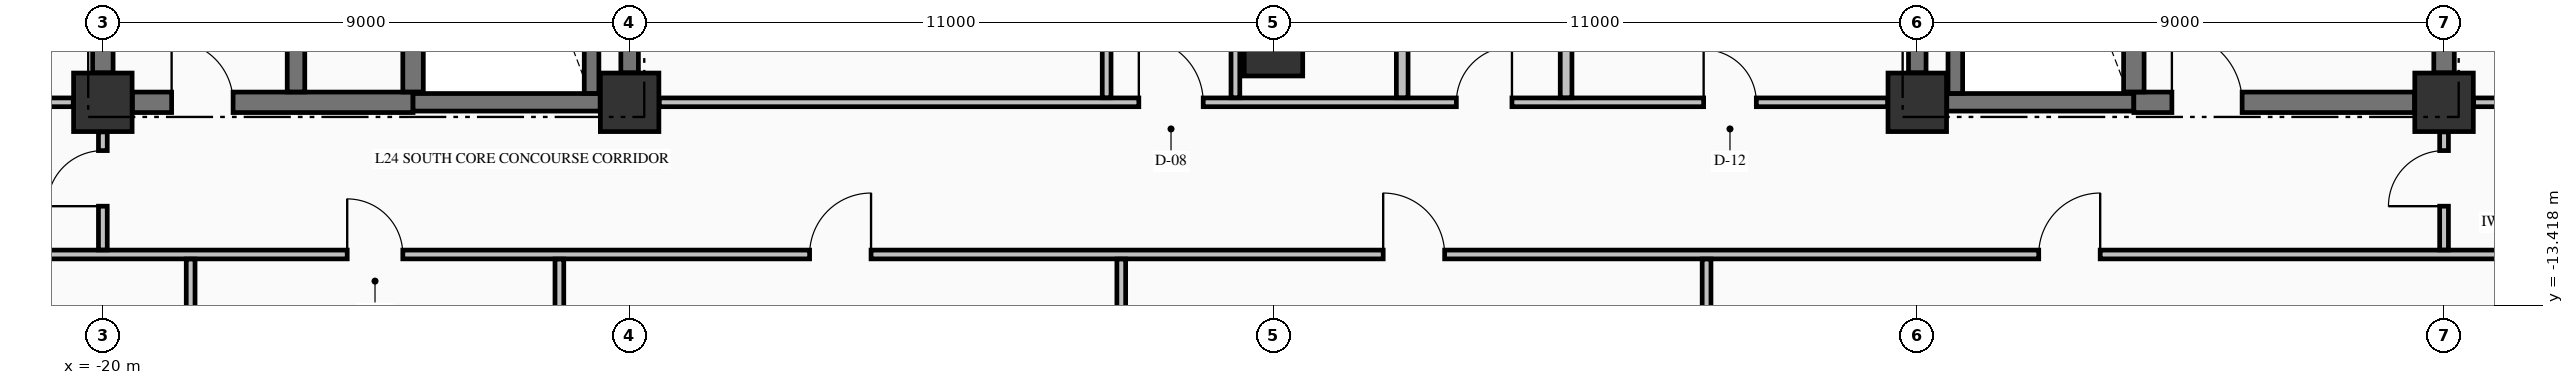
"""IFC4 building model, lengths in metres.
Left out: names, types, materials, properties, quantities, classifications, styles, units other than length and angle.
Written with IfcOpenShell. Run it as: python <this file> out.ifc"""

import sys

from ifc_helpers import new_model, si_unit, direction, frame, frame_2d, origin, origin_2d, place, context, subcontext, project, spatial, rectangle, extrude, element, fill, save


model = new_model("IFC4")
c1 = context("Model", 3, precision=1e-05, world=origin(), true_north=direction((0.0, 1.0)))
c2 = subcontext(c1, "Body", "Model", "MODEL_VIEW")
j1 = project(units=[si_unit("LENGTHUNIT", "METRE"), si_unit("PLANEANGLEUNIT", "RADIAN")], contexts=[c1])
p1 = place(None, origin())
s1 = spatial("IfcSite", under=j1, at=p1, CompositionType="ELEMENT")
p2 = place(p1, origin())
s2 = spatial("IfcBuilding", under=s1, at=p2, CompositionType="ELEMENT")
p3 = place(p2, frame((0.0, 0.0, 98.5)))
s3 = spatial("IfcBuildingStorey", under=s2, at=p3, CompositionType="ELEMENT", Elevation=98.5)
for number, where, z_axis, x_axis in (
    (1, (-20.0, -9.95, -0.275), (0.0, 0.0, 1.0), (1.0, 0.0, 0.0)),
    (2, (-11.0, -9.95, -0.275), (0.0, 0.0, 1.0), (1.0, 0.0, 0.0)),
    (3, (11.0, -9.95, -0.275), (0.0, 0.0, 1.0), (1.0, 0.0, 0.0)),
    (4, (20.0, -9.95, -0.275), (0.0, 0.0, 1.0), (1.0, 0.0, 0.0)),
    (5, (0.0, -9.0, -0.275), (0.0, 0.0, 1.0), (1.0, 0.0, 0.0)),
):
    element("IfcColumn", number, at=place(p3, frame(where, z_axis=z_axis, x_axis=x_axis)), inside=s3, PredefinedType="COLUMN", context=c2, shape_type="SweptSolid", body=[
        extrude(rectangle(XDim=1.0, YDim=1.0, at=origin_2d()), origin(), (0.0, 0.0, 1.0), 3.595),
    ])
p4 = place(p3, frame((-19.496, -9.95, 0.0), z_axis=(0.0, 0.0, 1.0), x_axis=(1.0, 0.0, 0.0)))
e6 = element("IfcWall", 6, at=p4, inside=s3, PredefinedType="SHEAR", context=c2, shape_type="SweptSolid", body=[
    extrude(rectangle(XDim=4.796, YDim=0.35, at=frame_2d((2.398, 0.0))), origin(), (0.0, 0.0, 1.0), 3.32),
])
p5 = place(p4, frame((0.671, 0.0, 0.0)))
e7 = element("IfcOpeningElement", 7, at=p5, cuts=e6, PredefinedType="OPENING", context=c2, shape_type="SweptSolid", body=[
    extrude(rectangle(XDim=1.05, YDim=2.15, at=frame_2d((0.525, 1.075))), frame((0.0, 0.185, 0.0), z_axis=(0.0, -1.0, 0.0), x_axis=(1.0, 0.0, 0.0)), (0.0, 0.0, 1.0), 0.37),
])
for number, where, z_axis, x_axis in (
    (8, (-14.7, -9.95, 0.0), (0.0, 0.0, 1.0), (1.0, 0.0, 0.0)),
    (9, (11.504, -9.95, 0.0), (0.0, 0.0, 1.0), (1.0, 0.0, 0.0)),
):
    element("IfcWall", number, at=place(p3, frame(where, z_axis=z_axis, x_axis=x_axis)), inside=s3, PredefinedType="SHEAR", context=c2, shape_type="SweptSolid", body=[
        extrude(rectangle(XDim=3.196, YDim=0.3, at=frame_2d((1.598, 0.0))), origin(), (0.0, 0.0, 1.0), 3.32),
    ])
p6 = place(p3, frame((14.7, -9.95, 0.0), z_axis=(0.0, 0.0, 1.0), x_axis=(1.0, 0.0, 0.0)))
e10 = element("IfcWall", 10, at=p6, inside=s3, PredefinedType="SHEAR", context=c2, shape_type="SweptSolid", body=[
    extrude(rectangle(XDim=4.796, YDim=0.35, at=frame_2d((2.398, 0.0))), origin(), (0.0, 0.0, 1.0), 3.32),
])
p7 = place(p6, frame((0.65, 0.0, 0.0)))
e11 = element("IfcOpeningElement", 11, at=p7, cuts=e10, PredefinedType="OPENING", context=c2, shape_type="SweptSolid", body=[
    extrude(rectangle(XDim=1.2, YDim=2.15, at=frame_2d((0.6, 1.075))), frame((0.0, 0.185, 0.0), z_axis=(0.0, -1.0, 0.0), x_axis=(1.0, 0.0, 0.0)), (0.0, 0.0, 1.0), 0.37),
])
p8 = place(p3, frame((-22.835, -12.55, 0.0), z_axis=(0.0, 0.0, 1.0), x_axis=(1.0, 0.0, 0.0)))
e12 = element("IfcWall", 12, at=p8, inside=s3, PredefinedType="PARTITIONING", context=c2, shape_type="SweptSolid", body=[
    extrude(rectangle(XDim=50.67, YDim=0.15, at=frame_2d((25.335, 0.0))), origin(), (0.0, 0.0, 1.0), 3.32),
])
p9 = place(p8, frame((7.01, 0.0, 0.0)))
e13 = element("IfcOpeningElement", 13, at=p9, cuts=e12, PredefinedType="OPENING", context=c2, shape_type="SweptSolid", body=[
    extrude(rectangle(XDim=0.95, YDim=2.15, at=frame_2d((0.475, 1.075))), frame((0.0, 0.085, 0.0), z_axis=(0.0, -1.0, 0.0), x_axis=(1.0, 0.0, 0.0)), (0.0, 0.0, 1.0), 0.17),
])
p10 = place(p8, frame((14.91, 0.0, 0.0)))
e14 = element("IfcOpeningElement", 14, at=p10, cuts=e12, PredefinedType="OPENING", context=c2, shape_type="SweptSolid", body=[
    extrude(rectangle(XDim=1.05, YDim=2.15, at=frame_2d((0.525, 1.075))), frame((0.0, 0.085, 0.0), z_axis=(0.0, -1.0, 0.0), x_axis=(1.0, 0.0, 0.0)), (0.0, 0.0, 1.0), 0.17),
])
p11 = place(p8, frame((24.71, 0.0, 0.0)))
e15 = element("IfcOpeningElement", 15, at=p11, cuts=e12, PredefinedType="OPENING", context=c2, shape_type="SweptSolid", body=[
    extrude(rectangle(XDim=1.05, YDim=2.15, at=frame_2d((0.525, 1.075))), frame((0.0, 0.085, 0.0), z_axis=(0.0, -1.0, 0.0), x_axis=(1.0, 0.0, 0.0)), (0.0, 0.0, 1.0), 0.17),
])
p12 = place(p8, frame((35.91, 0.0, 0.0)))
e16 = element("IfcOpeningElement", 16, at=p12, cuts=e12, PredefinedType="OPENING", context=c2, shape_type="SweptSolid", body=[
    extrude(rectangle(XDim=1.05, YDim=2.15, at=frame_2d((0.525, 1.075))), frame((0.0, 0.085, 0.0), z_axis=(0.0, -1.0, 0.0), x_axis=(1.0, 0.0, 0.0)), (0.0, 0.0, 1.0), 0.17),
])
p13 = place(p3, frame((-22.835, -9.95, 0.0), z_axis=(0.0, 0.0, 1.0), x_axis=(1.0, 0.0, 0.0)))
e17 = element("IfcWall", 17, at=p13, inside=s3, PredefinedType="PARTITIONING", context=c2, shape_type="SweptSolid", body=[
    extrude(rectangle(XDim=2.329, YDim=0.15, at=frame_2d((1.165, 0.0))), origin(), (0.0, 0.0, 1.0), 3.32),
])
p14 = place(p13, frame((0.86, 0.0, 0.0)))
e18 = element("IfcOpeningElement", 18, at=p14, cuts=e17, PredefinedType="OPENING", context=c2, shape_type="SweptSolid", body=[
    extrude(rectangle(XDim=0.95, YDim=2.15, at=frame_2d((0.475, 1.075))), frame((0.0, 0.085, 0.0), z_axis=(0.0, -1.0, 0.0), x_axis=(1.0, 0.0, 0.0)), (0.0, 0.0, 1.0), 0.17),
])
p15 = place(p3, frame((-10.494, -9.95, 0.0), z_axis=(0.0, 0.0, 1.0), x_axis=(1.0, 0.0, 0.0)))
e19 = element("IfcWall", 19, at=p15, inside=s3, PredefinedType="PARTITIONING", context=c2, shape_type="SweptSolid", body=[
    extrude(rectangle(XDim=20.988, YDim=0.15, at=frame_2d((10.494, 0.0))), origin(), (0.0, 0.0, 1.0), 3.32),
])
p16 = place(p15, frame((8.194, 0.0, 0.0)))
e20 = element("IfcOpeningElement", 20, at=p16, cuts=e19, PredefinedType="OPENING", context=c2, shape_type="SweptSolid", body=[
    extrude(rectangle(XDim=1.1, YDim=2.15, at=frame_2d((0.55, 1.075))), frame((0.0, 0.085, 0.0), z_axis=(0.0, -1.0, 0.0), x_axis=(1.0, 0.0, 0.0)), (0.0, 0.0, 1.0), 0.17),
])
p17 = place(p15, frame((13.619, 0.0, 0.0)))
e21 = element("IfcOpeningElement", 21, at=p17, cuts=e19, PredefinedType="OPENING", context=c2, shape_type="SweptSolid", body=[
    extrude(rectangle(XDim=0.95, YDim=2.15, at=frame_2d((0.475, 1.075))), frame((0.0, 0.085, 0.0), z_axis=(0.0, -1.0, 0.0), x_axis=(1.0, 0.0, 0.0)), (0.0, 0.0, 1.0), 0.17),
])
p18 = place(p15, frame((17.844, 0.0, 0.0)))
e22 = element("IfcOpeningElement", 22, at=p18, cuts=e19, PredefinedType="OPENING", context=c2, shape_type="SweptSolid", body=[
    extrude(rectangle(XDim=0.9, YDim=2.15, at=frame_2d((0.45, 1.075))), frame((0.0, 0.085, 0.0), z_axis=(0.0, -1.0, 0.0), x_axis=(1.0, 0.0, 0.0)), (0.0, 0.0, 1.0), 0.17),
])
p19 = place(p3, frame((20.506, -9.95, 0.0), z_axis=(0.0, 0.0, 1.0), x_axis=(1.0, 0.0, 0.0)))
e23 = element("IfcWall", 23, at=p19, inside=s3, PredefinedType="PARTITIONING", context=c2, shape_type="SweptSolid", body=[
    extrude(rectangle(XDim=7.329, YDim=0.15, at=frame_2d((3.665, 0.0))), origin(), (0.0, 0.0, 1.0), 3.32),
])
p20 = place(p19, frame((2.994, 0.0, 0.0)))
e24 = element("IfcOpeningElement", 24, at=p20, cuts=e23, PredefinedType="OPENING", context=c2, shape_type="SweptSolid", body=[
    extrude(rectangle(XDim=1.0, YDim=2.15, at=frame_2d((0.5, 1.075))), frame((0.0, 0.085, 0.0), z_axis=(0.0, -1.0, 0.0), x_axis=(1.0, 0.0, 0.0)), (0.0, 0.0, 1.0), 0.17),
])
p21 = place(p3, frame((-20.0, -9.446, 0.0), z_axis=(0.0, 0.0, 1.0), x_axis=(0.0, 1.0, 0.0)))
e25 = element("IfcWall", 25, at=p21, inside=s3, PredefinedType="SHEAR", context=c2, shape_type="SweptSolid", body=[
    extrude(rectangle(XDim=8.942, YDim=0.35, at=frame_2d((4.471, 0.0))), origin(), (0.0, 0.0, 1.0), 3.32),
])
p22 = place(p3, frame((-16.7, -9.773, 0.0), z_axis=(0.0, 0.0, 1.0), x_axis=(0.0, 1.0, 0.0)))
e26 = element("IfcWall", 26, at=p22, inside=s3, PredefinedType="SHEAR", context=c2, shape_type="SweptSolid", body=[
    extrude(rectangle(XDim=9.371, YDim=0.3, at=frame_2d((4.686, 0.0))), origin(), (0.0, 0.0, 1.0), 3.32),
])
p23 = place(p3, frame((-14.7, -9.773, 0.0), z_axis=(0.0, 0.0, 1.0), x_axis=(0.0, 1.0, 0.0)))
e27 = element("IfcWall", 27, at=p23, inside=s3, PredefinedType="SHEAR", context=c2, shape_type="SweptSolid", body=[
    extrude(rectangle(XDim=9.371, YDim=0.35, at=frame_2d((4.686, 0.0))), origin(), (0.0, 0.0, 1.0), 3.32),
])
p24 = place(p3, frame((-11.65, -9.798, 0.0), z_axis=(0.0, 0.0, 1.0), x_axis=(0.0, 1.0, 0.0)))
e28 = element("IfcWall", 28, at=p24, inside=s3, PredefinedType="SOLIDWALL", context=c2, shape_type="SweptSolid", body=[
    extrude(rectangle(XDim=9.396, YDim=0.25, at=frame_2d((4.698, 0.0))), origin(), (0.0, 0.0, 1.0), 3.32),
])
for number, where, z_axis, x_axis in (
    (29, (-11.0, -9.446, 0.0), (0.0, 0.0, 1.0), (0.0, 1.0, 0.0)),
    (30, (11.0, -9.446, 0.0), (0.0, 0.0, 1.0), (0.0, 1.0, 0.0)),
):
    element("IfcWall", number, at=place(p3, frame(where, z_axis=z_axis, x_axis=x_axis)), inside=s3, PredefinedType="SHEAR", context=c2, shape_type="SweptSolid", body=[
        extrude(rectangle(XDim=8.942, YDim=0.3, at=frame_2d((4.471, 0.0))), origin(), (0.0, 0.0, 1.0), 3.32),
    ])
p25 = place(p3, frame((11.65, -9.798, 0.0), z_axis=(0.0, 0.0, 1.0), x_axis=(0.0, 1.0, 0.0)))
e31 = element("IfcWall", 31, at=p25, inside=s3, PredefinedType="SOLIDWALL", context=c2, shape_type="SweptSolid", body=[
    extrude(rectangle(XDim=9.396, YDim=0.25, at=frame_2d((4.698, 0.0))), origin(), (0.0, 0.0, 1.0), 3.32),
])
p26 = place(p3, frame((14.7, -9.773, 0.0), z_axis=(0.0, 0.0, 1.0), x_axis=(0.0, 1.0, 0.0)))
e32 = element("IfcWall", 32, at=p26, inside=s3, PredefinedType="SHEAR", context=c2, shape_type="SweptSolid", body=[
    extrude(rectangle(XDim=9.371, YDim=0.35, at=frame_2d((4.686, 0.0))), origin(), (0.0, 0.0, 1.0), 3.32),
])
p27 = place(p3, frame((20.0, -9.446, 0.0), z_axis=(0.0, 0.0, 1.0), x_axis=(0.0, 1.0, 0.0)))
e33 = element("IfcWall", 33, at=p27, inside=s3, PredefinedType="SHEAR", context=c2, shape_type="SweptSolid", body=[
    extrude(rectangle(XDim=2.269, YDim=0.35, at=frame_2d((1.135, 0.0))), origin(), (0.0, 0.0, 1.0), 3.32),
])
p28 = place(p3, frame((-20.0, -12.472, 0.0), z_axis=(0.0, 0.0, 1.0), x_axis=(0.0, 1.0, 0.0)))
e34 = element("IfcWall", 34, at=p28, inside=s3, PredefinedType="PARTITIONING", context=c2, shape_type="SweptSolid", body=[
    extrude(rectangle(XDim=2.016, YDim=0.15, at=frame_2d((1.008, 0.0))), origin(), (0.0, 0.0, 1.0), 2.81),
])
p29 = place(p28, frame((0.747, 0.0, 0.0)))
e35 = element("IfcOpeningElement", 35, at=p29, cuts=e34, PredefinedType="OPENING", context=c2, shape_type="SweptSolid", body=[
    extrude(rectangle(XDim=0.95, YDim=2.15, at=frame_2d((0.475, 1.075))), frame((0.0, 0.085, 0.0), z_axis=(0.0, -1.0, 0.0), x_axis=(1.0, 0.0, 0.0)), (0.0, 0.0, 1.0), 0.17),
])
p30 = place(p3, frame((-18.5, -20.394, 0.0), z_axis=(0.0, 0.0, 1.0), x_axis=(0.0, 1.0, 0.0)))
e36 = element("IfcWall", 36, at=p30, inside=s3, PredefinedType="PARTITIONING", context=c2, shape_type="SweptSolid", body=[
    extrude(rectangle(XDim=7.766, YDim=0.15, at=frame_2d((3.883, 0.0))), origin(), (0.0, 0.0, 1.0), 3.32),
])
p31 = place(p3, frame((-12.2, -25.335, 0.0), z_axis=(0.0, 0.0, 1.0), x_axis=(0.0, 1.0, 0.0)))
e37 = element("IfcWall", 37, at=p31, inside=s3, PredefinedType="PARTITIONING", context=c2, shape_type="SweptSolid", body=[
    extrude(rectangle(XDim=12.707, YDim=0.15, at=frame_2d((6.354, 0.0))), origin(), (0.0, 0.0, 1.0), 3.32),
])
p32 = place(p3, frame((-2.85, -9.872, 0.0), z_axis=(0.0, 0.0, 1.0), x_axis=(0.0, 1.0, 0.0)))
e38 = element("IfcWall", 38, at=p32, inside=s3, PredefinedType="PARTITIONING", context=c2, shape_type="SweptSolid", body=[
    extrude(rectangle(XDim=9.544, YDim=0.15, at=frame_2d((4.772, 0.0))), origin(), (0.0, 0.0, 1.0), 3.32),
])
p33 = place(p3, frame((-2.6, -25.335, 0.0), z_axis=(0.0, 0.0, 1.0), x_axis=(0.0, 1.0, 0.0)))
e39 = element("IfcWall", 39, at=p33, inside=s3, PredefinedType="PARTITIONING", context=c2, shape_type="SweptSolid", body=[
    extrude(rectangle(XDim=12.707, YDim=0.15, at=frame_2d((6.354, 0.0))), origin(), (0.0, 0.0, 1.0), 3.32),
])
p34 = place(p3, frame((-0.65, -9.872, 0.0), z_axis=(0.0, 0.0, 1.0), x_axis=(0.0, 1.0, 0.0)))
e40 = element("IfcWall", 40, at=p34, inside=s3, PredefinedType="PARTITIONING", context=c2, shape_type="SweptSolid", body=[
    extrude(rectangle(XDim=4.419, YDim=0.15, at=frame_2d((2.209, 0.0))), origin(), (0.0, 0.0, 1.0), 3.32),
])
p35 = place(p34, frame((2.597, 0.0, 0.0)))
e41 = element("IfcOpeningElement", 41, at=p35, cuts=e40, PredefinedType="OPENING", context=c2, shape_type="SweptSolid", body=[
    extrude(rectangle(XDim=0.95, YDim=2.15, at=frame_2d((0.475, 1.075))), frame((0.0, 0.085, 0.0), z_axis=(0.0, -1.0, 0.0), x_axis=(1.0, 0.0, 0.0)), (0.0, 0.0, 1.0), 0.17),
])
for number, where, z_axis, x_axis in (
    (42, (2.2, -9.872, 0.0), (0.0, 0.0, 1.0), (0.0, 1.0, 0.0)),
    (43, (5.0, -9.872, 0.0), (0.0, 0.0, 1.0), (0.0, 1.0, 0.0)),
):
    element("IfcWall", number, at=place(p3, frame(where, z_axis=z_axis, x_axis=x_axis)), inside=s3, PredefinedType="PARTITIONING", context=c2, shape_type="SweptSolid", body=[
        extrude(rectangle(XDim=4.419, YDim=0.2, at=frame_2d((2.209, 0.0))), origin(), (0.0, 0.0, 1.0), 3.32),
    ])
p36 = place(p3, frame((7.4, -25.335, 0.0), z_axis=(0.0, 0.0, 1.0), x_axis=(0.0, 1.0, 0.0)))
e44 = element("IfcWall", 44, at=p36, inside=s3, PredefinedType="PARTITIONING", context=c2, shape_type="SweptSolid", body=[
    extrude(rectangle(XDim=12.707, YDim=0.15, at=frame_2d((6.354, 0.0))), origin(), (0.0, 0.0, 1.0), 3.32),
])
p37 = place(p3, frame((20.0, -12.472, 0.0), z_axis=(0.0, 0.0, 1.0), x_axis=(0.0, 1.0, 0.0)))
e45 = element("IfcWall", 45, at=p37, inside=s3, PredefinedType="PARTITIONING", context=c2, shape_type="SweptSolid", body=[
    extrude(rectangle(XDim=2.016, YDim=0.15, at=frame_2d((1.008, 0.0))), origin(), (0.0, 0.0, 1.0), 2.81),
])
p38 = place(p37, frame((0.747, 0.0, 0.0)))
e46 = element("IfcOpeningElement", 46, at=p38, cuts=e45, PredefinedType="OPENING", context=c2, shape_type="SweptSolid", body=[
    extrude(rectangle(XDim=0.95, YDim=2.15, at=frame_2d((0.475, 1.075))), frame((0.0, 0.085, 0.0), z_axis=(0.0, -1.0, 0.0), x_axis=(1.0, 0.0, 0.0)), (0.0, 0.0, 1.0), 0.17),
])
p39 = place(p5, origin())
e47 = element("IfcDoor", 47, at=p39, inside=s3, OperationType="SINGLE_SWING_LEFT", PredefinedType="DOOR", context=c2, shape_type="SweptSolid", body=[
    extrude(rectangle(XDim=1.05, YDim=2.15, at=frame_2d((0.525, 1.075))), frame((0.0, 0.025, 0.0), z_axis=(0.0, -1.0, 0.0), x_axis=(1.0, 0.0, 0.0)), (0.0, 0.0, 1.0), 0.05),
])
fill(e7, e47)
p40 = place(p7, origin())
e48 = element("IfcDoor", 48, at=p40, inside=s3, OperationType="SINGLE_SWING_LEFT", PredefinedType="DOOR", context=c2, shape_type="SweptSolid", body=[
    extrude(rectangle(XDim=1.2, YDim=2.15, at=frame_2d((0.6, 1.075))), frame((0.0, 0.025, 0.0), z_axis=(0.0, -1.0, 0.0), x_axis=(1.0, 0.0, 0.0)), (0.0, 0.0, 1.0), 0.05),
])
fill(e11, e48)
p41 = place(p16, origin())
e49 = element("IfcDoor", 49, at=p41, inside=s3, OperationType="SINGLE_SWING_LEFT", PredefinedType="DOOR", context=c2, shape_type="SweptSolid", body=[
    extrude(rectangle(XDim=1.1, YDim=2.15, at=frame_2d((0.55, 1.075))), frame((0.0, 0.025, 0.0), z_axis=(0.0, -1.0, 0.0), x_axis=(1.0, 0.0, 0.0)), (0.0, 0.0, 1.0), 0.05),
])
fill(e20, e49)
p42 = place(p9, origin())
e50 = element("IfcDoor", 50, at=p42, inside=s3, OperationType="SINGLE_SWING_LEFT", PredefinedType="DOOR", context=c2, shape_type="SweptSolid", body=[
    extrude(rectangle(XDim=0.95, YDim=2.15, at=frame_2d((0.475, 1.075))), frame((0.0, 0.025, 0.0), z_axis=(0.0, -1.0, 0.0), x_axis=(1.0, 0.0, 0.0)), (0.0, 0.0, 1.0), 0.05),
])
fill(e13, e50)
p43 = place(p10, origin())
e51 = element("IfcDoor", 51, at=p43, inside=s3, OperationType="SINGLE_SWING_RIGHT", PredefinedType="DOOR", context=c2, shape_type="SweptSolid", body=[
    extrude(rectangle(XDim=1.05, YDim=2.15, at=frame_2d((0.525, 1.075))), frame((0.0, 0.025, 0.0), z_axis=(0.0, -1.0, 0.0), x_axis=(1.0, 0.0, 0.0)), (0.0, 0.0, 1.0), 0.05),
])
fill(e14, e51)
p44 = place(p11, origin())
e52 = element("IfcDoor", 52, at=p44, inside=s3, OperationType="SINGLE_SWING_LEFT", PredefinedType="DOOR", context=c2, shape_type="SweptSolid", body=[
    extrude(rectangle(XDim=1.05, YDim=2.15, at=frame_2d((0.525, 1.075))), frame((0.0, 0.025, 0.0), z_axis=(0.0, -1.0, 0.0), x_axis=(1.0, 0.0, 0.0)), (0.0, 0.0, 1.0), 0.05),
])
fill(e15, e52)
p45 = place(p12, origin())
e53 = element("IfcDoor", 53, at=p45, inside=s3, OperationType="SINGLE_SWING_RIGHT", PredefinedType="DOOR", context=c2, shape_type="SweptSolid", body=[
    extrude(rectangle(XDim=1.05, YDim=2.15, at=frame_2d((0.525, 1.075))), frame((0.0, 0.025, 0.0), z_axis=(0.0, -1.0, 0.0), x_axis=(1.0, 0.0, 0.0)), (0.0, 0.0, 1.0), 0.05),
])
fill(e16, e53)
p46 = place(p17, origin())
e54 = element("IfcDoor", 54, at=p46, inside=s3, OperationType="SINGLE_SWING_RIGHT", PredefinedType="DOOR", context=c2, shape_type="SweptSolid", body=[
    extrude(rectangle(XDim=0.95, YDim=2.15, at=frame_2d((0.475, 1.075))), frame((0.0, 0.025, 0.0), z_axis=(0.0, -1.0, 0.0), x_axis=(1.0, 0.0, 0.0)), (0.0, 0.0, 1.0), 0.05),
])
fill(e21, e54)
p47 = place(p18, origin())
e55 = element("IfcDoor", 55, at=p47, inside=s3, OperationType="SINGLE_SWING_LEFT", PredefinedType="DOOR", context=c2, shape_type="SweptSolid", body=[
    extrude(rectangle(XDim=0.9, YDim=2.15, at=frame_2d((0.45, 1.075))), frame((0.0, 0.025, 0.0), z_axis=(0.0, -1.0, 0.0), x_axis=(1.0, 0.0, 0.0)), (0.0, 0.0, 1.0), 0.05),
])
fill(e22, e55)
p48 = place(p29, origin())
e56 = element("IfcDoor", 56, at=p48, inside=s3, OperationType="SINGLE_SWING_LEFT", PredefinedType="DOOR", context=c2, shape_type="SweptSolid", body=[
    extrude(rectangle(XDim=0.95, YDim=2.15, at=frame_2d((0.475, 1.075))), frame((0.0, 0.025, 0.0), z_axis=(0.0, -1.0, 0.0), x_axis=(1.0, 0.0, 0.0)), (0.0, 0.0, 1.0), 0.05),
])
fill(e35, e56)
p49 = place(p38, origin())
e57 = element("IfcDoor", 57, at=p49, inside=s3, OperationType="SINGLE_SWING_LEFT", PredefinedType="DOOR", context=c2, shape_type="SweptSolid", body=[
    extrude(rectangle(XDim=0.95, YDim=2.15, at=frame_2d((0.475, 1.075))), frame((0.0, 0.025, 0.0), z_axis=(0.0, -1.0, 0.0), x_axis=(1.0, 0.0, 0.0)), (0.0, 0.0, 1.0), 0.05),
])
fill(e46, e57)
save(model, sys.argv[1])
